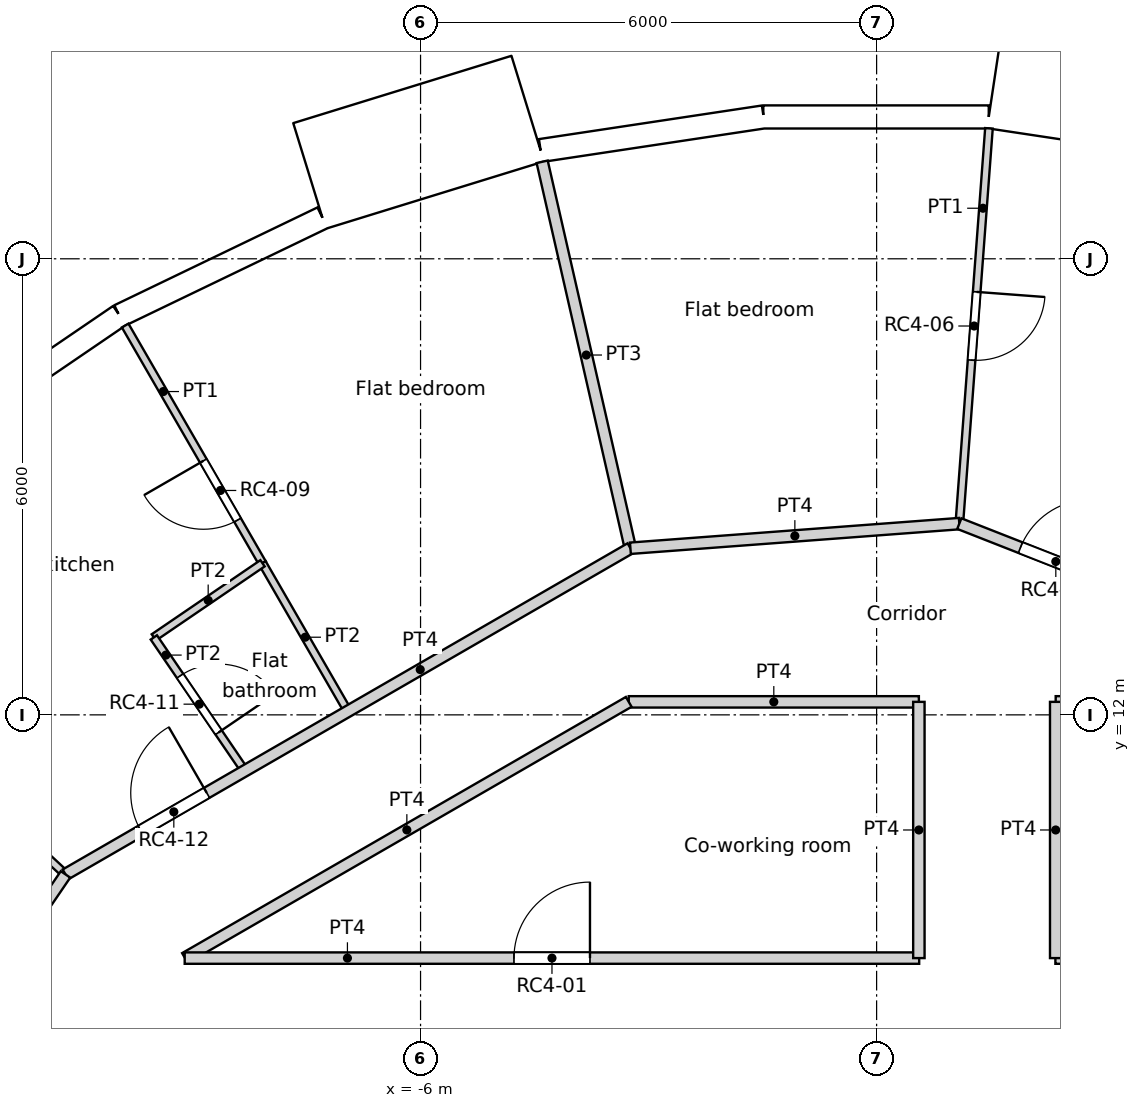
"""IFC4 building model, lengths in metres.
Left out: names, types, materials, properties, quantities, classifications, styles, units other than length and angle.
Written with IfcOpenShell. Run it as: python <this file> out.ifc"""

import sys

from ifc_helpers import new_model, si_unit, direction, frame, frame_2d, origin, origin_2d, place, context, subcontext, project, spatial, rectangle, circle, extrude, element, fill, save


model = new_model("IFC4")
c1 = context("Model", 3, precision=1e-05, world=origin(), true_north=direction((0.0, 1.0)))
c2 = subcontext(c1, "Body", "Model", "MODEL_VIEW")
j1 = project(units=[si_unit("LENGTHUNIT", "METRE"), si_unit("PLANEANGLEUNIT", "RADIAN")], contexts=[c1])
p1 = place(None, origin())
s1 = spatial("IfcSite", under=j1, at=p1, CompositionType="ELEMENT")
p2 = place(p1, origin())
s2 = spatial("IfcBuilding", under=s1, at=p2, CompositionType="ELEMENT")
p3 = place(p2, frame((0.0, 0.0, 263.4)))
s3 = spatial("IfcBuildingStorey", under=s2, at=p3, CompositionType="ELEMENT", Elevation=263.4)
for number, where, z_axis, x_axis in (
    (1, (1.406, 18.77, 0.0), (0.0, 0.0, 1.0), (1.0, 0.0, 0.0)),
    (2, (-4.188, 18.35, 0.0), (0.0, 0.0, 1.0), (1.0, 0.0, 0.0)),
    (3, (-9.411, 16.301, 0.0), (0.0, 0.0, 1.0), (1.0, 0.0, 0.0)),
):
    element("IfcColumn", number, at=place(p3, frame(where, z_axis=z_axis, x_axis=x_axis)), inside=s3, PredefinedType="COLUMN", context=c2, shape_type="SweptSolid", body=[
        extrude(circle(Radius=0.55, at=origin_2d()), origin(), (0.0, 0.0, 1.0), 3.6),
    ])
p4 = place(p3, frame((4.53, 19.989, -0.35), z_axis=(0.0, 0.0, 1.0), x_axis=(-0.988836445254, 0.149004981587, 0.0)))
e4 = element("IfcWall", 4, at=p4, inside=s3, PredefinedType="ELEMENTEDWALL", context=c2, shape_type="SweptSolid", body=[
    extrude(rectangle(XDim=3.0, YDim=1.45, at=frame_2d((1.5, 0.0))), origin(), (0.0, 0.0, 1.0), 3.6),
])
p5 = place(p4, frame((1.5, 0.0, 1.9)))
e5 = element("IfcOpeningElement", 5, at=p5, cuts=e4, PredefinedType="OPENING", context=c2, shape_type="SweptSolid", body=[
    extrude(circle(Radius=0.9, at=origin_2d()), frame((0.0, 0.735, 0.0), z_axis=(0.0, -1.0, 0.0), x_axis=(1.0, 0.0, 0.0)), (0.0, 0.0, 1.0), 1.47),
])
p6 = place(p3, frame((1.473, 19.866, 0.0), z_axis=(0.0, 0.0, 1.0), x_axis=(-1.0, 0.0, 0.0)))
e6 = element("IfcWall", 6, at=p6, inside=s3, PredefinedType="SOLIDWALL", context=c2, shape_type="SweptSolid", body=[
    extrude(rectangle(XDim=2.962, YDim=0.3, at=frame_2d((1.481, 0.0))), origin(), (0.0, 0.0, 1.0), 3.25),
])
p7 = place(p6, frame((1.481, 0.0, 1.55)))
e7 = element("IfcOpeningElement", 7, at=p7, cuts=e6, PredefinedType="OPENING", context=c2, shape_type="SweptSolid", body=[
    extrude(circle(Radius=0.9, at=origin_2d()), frame((0.0, 0.16, 0.0), z_axis=(0.0, -1.0, 0.0), x_axis=(1.0, 0.0, 0.0)), (0.0, 0.0, 1.0), 0.32),
])
p8 = place(p3, frame((-1.489, 19.866, 0.0), z_axis=(0.0, 0.0, 1.0), x_axis=(-0.988835775663, -0.149009425104, 0.0)))
e8 = element("IfcWall", 8, at=p8, inside=s3, PredefinedType="SOLIDWALL", context=c2, shape_type="SweptSolid", body=[
    extrude(rectangle(XDim=2.962, YDim=0.3, at=frame_2d((1.481, 0.0))), origin(), (0.0, 0.0, 1.0), 3.25),
])
p9 = place(p8, frame((1.481, 0.0, 1.55)))
e9 = element("IfcOpeningElement", 9, at=p9, cuts=e8, PredefinedType="OPENING", context=c2, shape_type="SweptSolid", body=[
    extrude(circle(Radius=0.9, at=origin_2d()), frame((0.0, 0.16, 0.0), z_axis=(0.0, -1.0, 0.0), x_axis=(1.0, 0.0, 0.0)), (0.0, 0.0, 1.0), 0.32),
])
p10 = place(p3, frame((-4.592, 19.975, -0.35), z_axis=(0.0, 0.0, 1.0), x_axis=(-0.955571139978, -0.294760574774, 0.0)))
e10 = element("IfcWall", 10, at=p10, inside=s3, PredefinedType="ELEMENTEDWALL", context=c2, shape_type="SweptSolid", body=[
    extrude(rectangle(XDim=3.0, YDim=1.45, at=frame_2d((1.5, 0.0))), origin(), (0.0, 0.0, 1.0), 3.6),
])
p11 = place(p10, frame((1.5, 0.0, 1.9)))
e11 = element("IfcOpeningElement", 11, at=p11, cuts=e10, PredefinedType="OPENING", context=c2, shape_type="SweptSolid", body=[
    extrude(circle(Radius=0.9, at=origin_2d()), frame((0.0, 0.735, 0.0), z_axis=(0.0, -1.0, 0.0), x_axis=(1.0, 0.0, 0.0)), (0.0, 0.0, 1.0), 1.47),
])
p12 = place(p3, frame((-7.292, 18.538, 0.0), z_axis=(0.0, 0.0, 1.0), x_axis=(-0.90095513435, -0.433912255978, 0.0)))
e12 = element("IfcWall", 12, at=p12, inside=s3, PredefinedType="SOLIDWALL", context=c2, shape_type="SweptSolid", body=[
    extrude(rectangle(XDim=2.962, YDim=0.3, at=frame_2d((1.481, 0.0))), origin(), (0.0, 0.0, 1.0), 3.25),
])
p13 = place(p12, frame((1.481, 0.0, 1.55)))
e13 = element("IfcOpeningElement", 13, at=p13, cuts=e12, PredefinedType="OPENING", context=c2, shape_type="SweptSolid", body=[
    extrude(circle(Radius=0.9, at=origin_2d()), frame((0.0, 0.16, 0.0), z_axis=(0.0, -1.0, 0.0), x_axis=(1.0, 0.0, 0.0)), (0.0, 0.0, 1.0), 0.32),
])
p14 = place(p3, frame((-9.961, 17.253, 0.0), z_axis=(0.0, 0.0, 1.0), x_axis=(-0.826236061068, -0.563324037646, 0.0)))
e14 = element("IfcWall", 14, at=p14, inside=s3, PredefinedType="SOLIDWALL", context=c2, shape_type="SweptSolid", body=[
    extrude(rectangle(XDim=2.962, YDim=0.3, at=frame_2d((1.481, 0.0))), origin(), (0.0, 0.0, 1.0), 3.25),
])
p15 = place(p14, frame((1.481, 0.0, 1.55)))
e15 = element("IfcOpeningElement", 15, at=p15, cuts=e14, PredefinedType="OPENING", context=c2, shape_type="SweptSolid", body=[
    extrude(circle(Radius=0.9, at=origin_2d()), frame((0.0, 0.16, 0.0), z_axis=(0.0, -1.0, 0.0), x_axis=(1.0, 0.0, 0.0)), (0.0, 0.0, 1.0), 0.32),
])
p16 = place(p3, frame((-9.103, 8.8, 0.0), z_axis=(0.0, 0.0, 1.0), x_axis=(1.0, 0.0, 0.0)))
e16 = element("IfcWall", 16, at=p16, inside=s3, PredefinedType="PARTITIONING", context=c2, shape_type="SweptSolid", body=[
    extrude(rectangle(XDim=9.663, YDim=0.15, at=frame_2d((4.832, 0.0))), origin(), (0.0, 0.0, 1.0), 3.25),
])
p17 = place(p16, frame((4.332, 0.0, 0.0)))
e17 = element("IfcOpeningElement", 17, at=p17, cuts=e16, PredefinedType="OPENING", context=c2, shape_type="SweptSolid", body=[
    extrude(rectangle(XDim=1.0, YDim=2.04, at=frame_2d((0.5, 1.02))), frame((0.0, 0.075, 0.0), z_axis=(0.0, -1.0, 0.0), x_axis=(1.0, 0.0, 0.0)), (0.0, 0.0, 1.0), 0.15),
])
p18 = place(p3, frame((2.352, 8.8, 0.0), z_axis=(0.0, 0.0, 1.0), x_axis=(1.0, 0.0, 0.0)))
e18 = element("IfcWall", 18, at=p18, inside=s3, PredefinedType="PARTITIONING", context=c2, shape_type="SweptSolid", body=[
    extrude(rectangle(XDim=6.749, YDim=0.15, at=frame_2d((3.374, 0.0))), origin(), (0.0, 0.0, 1.0), 3.25),
])
p19 = place(p18, frame((2.87, 0.0, 0.0)))
e19 = element("IfcOpeningElement", 19, at=p19, cuts=e18, PredefinedType="OPENING", context=c2, shape_type="SweptSolid", body=[
    extrude(rectangle(XDim=1.0, YDim=2.04, at=frame_2d((0.5, 1.02))), frame((0.0, 0.075, 0.0), z_axis=(0.0, -1.0, 0.0), x_axis=(1.0, 0.0, 0.0)), (0.0, 0.0, 1.0), 0.15),
])
p20 = place(p3, frame((0.556, 8.8, 0.0), z_axis=(0.0, 0.0, 1.0), x_axis=(0.0, 1.0, 0.0)))
e20 = element("IfcWall", 20, at=p20, inside=s3, PredefinedType="PARTITIONING", context=c2, shape_type="SweptSolid", body=[
    extrude(rectangle(XDim=3.371, YDim=0.15, at=frame_2d((1.686, 0.0))), origin(), (0.0, 0.0, 1.0), 3.25),
])
p21 = place(p3, frame((-3.261, 12.171, 0.0), z_axis=(0.0, 0.0, 1.0), x_axis=(1.0, 0.0, 0.0)))
e21 = element("IfcWall", 21, at=p21, inside=s3, PredefinedType="PARTITIONING", context=c2, shape_type="SweptSolid", body=[
    extrude(rectangle(XDim=3.817, YDim=0.15, at=frame_2d((1.908, 0.0))), origin(), (0.0, 0.0, 1.0), 3.25),
])
p22 = place(p3, frame((-9.099, 8.801, 0.0), z_axis=(0.0, 0.0, 1.0), x_axis=(0.866068593998, 0.499925184894, 0.0)))
e22 = element("IfcWall", 22, at=p22, inside=s3, PredefinedType="PARTITIONING", context=c2, shape_type="SweptSolid", body=[
    extrude(rectangle(XDim=6.741, YDim=0.15, at=frame_2d((3.371, 0.0))), origin(), (0.0, 0.0, 1.0), 3.25),
])
p23 = place(p3, frame((2.356, 12.171, 0.0), z_axis=(0.0, 0.0, 1.0), x_axis=(1.0, 0.0, 0.0)))
e23 = element("IfcWall", 23, at=p23, inside=s3, PredefinedType="PARTITIONING", context=c2, shape_type="SweptSolid", body=[
    extrude(rectangle(XDim=0.905, YDim=0.15, at=frame_2d((0.453, 0.0))), origin(), (0.0, 0.0, 1.0), 3.25),
])
p24 = place(p3, frame((2.356, 8.8, 0.0), z_axis=(0.0, 0.0, 1.0), x_axis=(0.0, 1.0, 0.0)))
e24 = element("IfcWall", 24, at=p24, inside=s3, PredefinedType="PARTITIONING", context=c2, shape_type="SweptSolid", body=[
    extrude(rectangle(XDim=3.371, YDim=0.15, at=frame_2d((1.686, 0.0))), origin(), (0.0, 0.0, 1.0), 3.25),
])
p25 = place(p3, frame((1.088, 14.516, 0.0), z_axis=(0.0, 0.0, 1.0), x_axis=(0.930800934608, -0.365526497168, 0.0)))
e25 = element("IfcWall", 25, at=p25, inside=s3, PredefinedType="PARTITIONING", context=c2, shape_type="SweptSolid", body=[
    extrude(rectangle(XDim=8.581, YDim=0.15, at=frame_2d((4.291, 0.0))), origin(), (0.0, 0.0, 1.0), 3.25),
])
p26 = place(p25, frame((0.864, 0.0, 0.0)))
e26 = element("IfcOpeningElement", 26, at=p26, cuts=e25, PredefinedType="OPENING", context=c2, shape_type="SweptSolid", body=[
    extrude(rectangle(XDim=1.0, YDim=2.1, at=frame_2d((0.5, 1.05))), frame((0.0, 0.075, 0.0), z_axis=(0.0, -1.0, 0.0), x_axis=(1.0, 0.0, 0.0)), (0.0, 0.0, 1.0), 0.15),
])
p27 = place(p3, frame((-3.239, 14.192, 0.0), z_axis=(0.0, 0.0, 1.0), x_axis=(0.997204448067, 0.074721407608, 0.0)))
e27 = element("IfcWall", 27, at=p27, inside=s3, PredefinedType="PARTITIONING", context=c2, shape_type="SweptSolid", body=[
    extrude(rectangle(XDim=4.339, YDim=0.15, at=frame_2d((2.169, 0.0))), origin(), (0.0, 0.0, 1.0), 3.25),
])
p28 = place(p3, frame((-10.671, 9.901, 0.0), z_axis=(0.0, 0.0, 1.0), x_axis=(0.866021669971, 0.500006467099, 0.0)))
e28 = element("IfcWall", 28, at=p28, inside=s3, PredefinedType="PARTITIONING", context=c2, shape_type="SweptSolid", body=[
    extrude(rectangle(XDim=8.582, YDim=0.15, at=frame_2d((4.291, 0.0))), origin(), (0.0, 0.0, 1.0), 3.25),
])
p29 = place(p28, frame((1.146, 0.0, 0.0)))
e29 = element("IfcOpeningElement", 29, at=p29, cuts=e28, PredefinedType="OPENING", context=c2, shape_type="SweptSolid", body=[
    extrude(rectangle(XDim=1.0, YDim=2.1, at=frame_2d((0.5, 1.05))), frame((0.0, 0.075, 0.0), z_axis=(0.0, -1.0, 0.0), x_axis=(1.0, 0.0, 0.0)), (0.0, 0.0, 1.0), 0.15),
])
p30 = place(p3, frame((-13.115, 6.316, 0.0), z_axis=(0.0, 0.0, 1.0), x_axis=(0.563305396331, 0.826248770325, 0.0)))
e30 = element("IfcWall", 30, at=p30, inside=s3, PredefinedType="PARTITIONING", context=c2, shape_type="SweptSolid", body=[
    extrude(rectangle(XDim=4.339, YDim=0.15, at=frame_2d((2.169, 0.0))), origin(), (0.0, 0.0, 1.0), 3.25),
])
p31 = place(p3, frame((1.088, 14.516, 0.0), z_axis=(0.0, 0.0, 1.0), x_axis=(0.074816718541, 0.997197301755, 0.0)))
e31 = element("IfcWall", 31, at=p31, inside=s3, PredefinedType="PARTITIONING", context=c2, shape_type="SweptSolid", body=[
    extrude(rectangle(XDim=5.215, YDim=0.1, at=frame_2d((2.607, 0.0))), origin(), (0.0, 0.0, 1.0), 3.25),
])
p32 = place(p31, frame((2.157, 0.0, 0.0)))
e32 = element("IfcOpeningElement", 32, at=p32, cuts=e31, PredefinedType="OPENING", context=c2, shape_type="SweptSolid", body=[
    extrude(rectangle(XDim=0.9, YDim=2.1, at=frame_2d((0.45, 1.05))), frame((0.0, 0.05, 0.0), z_axis=(0.0, -1.0, 0.0), x_axis=(1.0, 0.0, 0.0)), (0.0, 0.0, 1.0), 0.1),
])
p33 = place(p3, frame((-4.4, 19.276, 0.0), z_axis=(0.0, 0.0, 1.0), x_axis=(0.222612505682, -0.974907007008, 0.0)))
e33 = element("IfcWall", 33, at=p33, inside=s3, PredefinedType="PARTITIONING", context=c2, shape_type="SweptSolid", body=[
    extrude(rectangle(XDim=5.215, YDim=0.15, at=frame_2d((2.607, 0.0))), origin(), (0.0, 0.0, 1.0), 3.25),
])
p34 = place(p3, frame((-9.886, 17.122, 0.0), z_axis=(0.0, 0.0, 1.0), x_axis=(0.500172881213, -0.865925567759, 0.0)))
e34 = element("IfcWall", 34, at=p34, inside=s3, PredefinedType="PARTITIONING", context=c2, shape_type="SweptSolid", body=[
    extrude(rectangle(XDim=3.613, YDim=0.1, at=frame_2d((1.806, 0.0))), origin(), (0.0, 0.0, 1.0), 3.25),
])
p35 = place(p34, frame((2.056, 0.0, 0.0)))
e35 = element("IfcOpeningElement", 35, at=p35, cuts=e34, PredefinedType="OPENING", context=c2, shape_type="SweptSolid", body=[
    extrude(rectangle(XDim=0.9, YDim=2.1, at=frame_2d((0.45, 1.05))), frame((0.0, 0.05, 0.0), z_axis=(0.0, -1.0, 0.0), x_axis=(1.0, 0.0, 0.0)), (0.0, 0.0, 1.0), 0.1),
])
p36 = place(p3, frame((-14.493, 13.448, 0.0), z_axis=(0.0, 0.0, 1.0), x_axis=(0.732975231717, -0.680255326836, 0.0)))
e36 = element("IfcWall", 36, at=p36, inside=s3, PredefinedType="PARTITIONING", context=c2, shape_type="SweptSolid", body=[
    extrude(rectangle(XDim=5.214, YDim=0.1, at=frame_2d((2.607, 0.0))), origin(), (0.0, 0.0, 1.0), 3.25),
])
p37 = place(p36, frame((2.157, 0.0, 0.0)))
e37 = element("IfcOpeningElement", 37, at=p37, cuts=e36, PredefinedType="OPENING", context=c2, shape_type="SweptSolid", body=[
    extrude(rectangle(XDim=0.9, YDim=2.1, at=frame_2d((0.45, 1.05))), frame((0.0, 0.05, 0.0), z_axis=(0.0, -1.0, 0.0), x_axis=(1.0, 0.0, 0.0)), (0.0, 0.0, 1.0), 0.1),
])
p38 = place(p3, frame((-9.509, 13.019, 0.0), z_axis=(0.0, 0.0, 1.0), x_axis=(0.826254203104, 0.563297427522, 0.0)))
e38 = element("IfcWall", 38, at=p38, inside=s3, PredefinedType="PARTITIONING", context=c2, shape_type="SweptSolid", body=[
    extrude(rectangle(XDim=1.731, YDim=0.1, at=frame_2d((0.865, 0.0))), origin(), (0.0, 0.0, 1.0), 3.25),
])
p39 = place(p3, frame((-9.509, 13.019, 0.0), z_axis=(0.0, 0.0, 1.0), x_axis=(0.563233448692, -0.826297816937, 0.0)))
e39 = element("IfcWall", 39, at=p39, inside=s3, PredefinedType="PARTITIONING", context=c2, shape_type="SweptSolid", body=[
    extrude(rectangle(XDim=2.125, YDim=0.1, at=frame_2d((1.062, 0.0))), origin(), (0.0, 0.0, 1.0), 3.25),
])
p40 = place(p39, frame((0.613, 0.0, 0.0)))
e40 = element("IfcOpeningElement", 40, at=p40, cuts=e39, PredefinedType="OPENING", context=c2, shape_type="SweptSolid", body=[
    extrude(rectangle(XDim=0.9, YDim=2.0, at=frame_2d((0.45, 1.0))), frame((0.0, 0.05, 0.0), z_axis=(0.0, -1.0, 0.0), x_axis=(1.0, 0.0, 0.0)), (0.0, 0.0, 1.0), 0.1),
])
p41 = place(p3, frame((-8.081, 13.997, 0.0), z_axis=(0.0, 0.0, 1.0), x_axis=(0.49982252503, -0.866127844762, 0.0)))
e41 = element("IfcWall", 41, at=p41, inside=s3, PredefinedType="PARTITIONING", context=c2, shape_type="SweptSolid", body=[
    extrude(rectangle(XDim=2.253, YDim=0.1, at=frame_2d((1.126, 0.0))), origin(), (0.0, 0.0, 1.0), 3.25),
])
p42 = place(p5, origin())
e42 = element("IfcWindow", 42, at=p42, inside=s3, PartitioningType="SINGLE_PANEL", PredefinedType="WINDOW", context=c2, shape_type="SweptSolid", body=[
    extrude(circle(Radius=0.9, at=origin_2d()), frame((0.0, 0.695, 0.0), z_axis=(0.0, -1.0, 0.0), x_axis=(1.0, 0.0, 0.0)), (0.0, 0.0, 1.0), 0.1),
])
fill(e5, e42)
p43 = place(p7, origin())
e43 = element("IfcWindow", 43, at=p43, inside=s3, PartitioningType="SINGLE_PANEL", PredefinedType="WINDOW", context=c2, shape_type="SweptSolid", body=[
    extrude(circle(Radius=0.9, at=origin_2d()), frame((0.0, 0.12, 0.0), z_axis=(0.0, -1.0, 0.0), x_axis=(1.0, 0.0, 0.0)), (0.0, 0.0, 1.0), 0.1),
])
fill(e7, e43)
p44 = place(p9, origin())
e44 = element("IfcWindow", 44, at=p44, inside=s3, PartitioningType="SINGLE_PANEL", PredefinedType="WINDOW", context=c2, shape_type="SweptSolid", body=[
    extrude(circle(Radius=0.9, at=origin_2d()), frame((0.0, 0.12, 0.0), z_axis=(0.0, -1.0, 0.0), x_axis=(1.0, 0.0, 0.0)), (0.0, 0.0, 1.0), 0.1),
])
fill(e9, e44)
p45 = place(p11, origin())
e45 = element("IfcWindow", 45, at=p45, inside=s3, PartitioningType="SINGLE_PANEL", PredefinedType="WINDOW", context=c2, shape_type="SweptSolid", body=[
    extrude(circle(Radius=0.9, at=origin_2d()), frame((0.0, 0.695, 0.0), z_axis=(0.0, -1.0, 0.0), x_axis=(1.0, 0.0, 0.0)), (0.0, 0.0, 1.0), 0.1),
])
fill(e11, e45)
p46 = place(p13, origin())
e46 = element("IfcWindow", 46, at=p46, inside=s3, PartitioningType="SINGLE_PANEL", PredefinedType="WINDOW", context=c2, shape_type="SweptSolid", body=[
    extrude(circle(Radius=0.9, at=origin_2d()), frame((0.0, 0.12, 0.0), z_axis=(0.0, -1.0, 0.0), x_axis=(1.0, 0.0, 0.0)), (0.0, 0.0, 1.0), 0.1),
])
fill(e13, e46)
p47 = place(p15, origin())
e47 = element("IfcWindow", 47, at=p47, inside=s3, PartitioningType="SINGLE_PANEL", PredefinedType="WINDOW", context=c2, shape_type="SweptSolid", body=[
    extrude(circle(Radius=0.9, at=origin_2d()), frame((0.0, 0.12, 0.0), z_axis=(0.0, -1.0, 0.0), x_axis=(1.0, 0.0, 0.0)), (0.0, 0.0, 1.0), 0.1),
])
fill(e15, e47)
p48 = place(p17, origin())
e48 = element("IfcDoor", 48, at=p48, inside=s3, OperationType="SINGLE_SWING_RIGHT", PredefinedType="DOOR", context=c2, shape_type="SweptSolid", body=[
    extrude(rectangle(XDim=1.0, YDim=2.04, at=frame_2d((0.5, 1.02))), frame((0.0, 0.025, 0.0), z_axis=(0.0, -1.0, 0.0), x_axis=(1.0, 0.0, 0.0)), (0.0, 0.0, 1.0), 0.05),
])
fill(e17, e48)
p49 = place(p32, origin())
e49 = element("IfcDoor", 49, at=p49, inside=s3, OperationType="SINGLE_SWING_LEFT", PredefinedType="DOOR", context=c2, shape_type="SweptSolid", body=[
    extrude(rectangle(XDim=0.9, YDim=2.1, at=frame_2d((0.45, 1.05))), frame((0.0, 0.025, 0.0), z_axis=(0.0, -1.0, 0.0), x_axis=(1.0, 0.0, 0.0)), (0.0, 0.0, 1.0), 0.05),
])
fill(e32, e49)
p50 = place(p26, origin())
e50 = element("IfcDoor", 50, at=p50, inside=s3, OperationType="SINGLE_SWING_RIGHT", PredefinedType="DOOR", context=c2, shape_type="SweptSolid", body=[
    extrude(rectangle(XDim=1.0, YDim=2.1, at=frame_2d((0.5, 1.05))), frame((0.0, 0.025, 0.0), z_axis=(0.0, -1.0, 0.0), x_axis=(1.0, 0.0, 0.0)), (0.0, 0.0, 1.0), 0.05),
])
fill(e26, e50)
p51 = place(p35, origin())
e51 = element("IfcDoor", 51, at=p51, inside=s3, OperationType="SINGLE_SWING_RIGHT", PredefinedType="DOOR", context=c2, shape_type="SweptSolid", body=[
    extrude(rectangle(XDim=0.9, YDim=2.1, at=frame_2d((0.45, 1.05))), frame((0.0, 0.025, 0.0), z_axis=(0.0, -1.0, 0.0), x_axis=(1.0, 0.0, 0.0)), (0.0, 0.0, 1.0), 0.05),
])
fill(e35, e51)
p52 = place(p40, origin())
e52 = element("IfcDoor", 52, at=p52, inside=s3, OperationType="SINGLE_SWING_RIGHT", PredefinedType="DOOR", context=c2, shape_type="SweptSolid", body=[
    extrude(rectangle(XDim=0.9, YDim=2.0, at=frame_2d((0.45, 1.0))), frame((0.0, 0.025, 0.0), z_axis=(0.0, -1.0, 0.0), x_axis=(1.0, 0.0, 0.0)), (0.0, 0.0, 1.0), 0.05),
])
fill(e40, e52)
p53 = place(p29, origin())
e53 = element("IfcDoor", 53, at=p53, inside=s3, OperationType="SINGLE_SWING_RIGHT", PredefinedType="DOOR", context=c2, shape_type="SweptSolid", body=[
    extrude(rectangle(XDim=1.0, YDim=2.1, at=frame_2d((0.5, 1.05))), frame((0.0, 0.025, 0.0), z_axis=(0.0, -1.0, 0.0), x_axis=(1.0, 0.0, 0.0)), (0.0, 0.0, 1.0), 0.05),
])
fill(e29, e53)
save(model, sys.argv[1])
